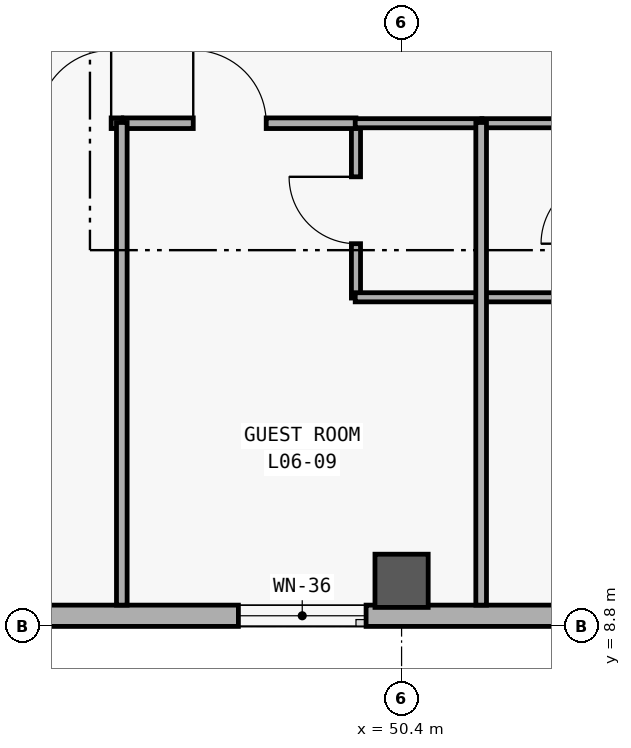
"""IFC4 building model, lengths in metres.
Left out: names, types, materials, properties, quantities, classifications, styles, units other than length and angle.
Written with IfcOpenShell. Run it as: python <this file> out.ifc"""

import sys

from ifc_helpers import new_model, si_unit, direction, frame, frame_2d, origin, origin_2d, place, context, subcontext, project, spatial, rectangle, extrude, element, fill, save


model = new_model("IFC4")
c1 = context("Model", 3, precision=1e-05, world=origin(), true_north=direction((0.0, 1.0)))
c2 = subcontext(c1, "Body", "Model", "MODEL_VIEW")
j1 = project(units=[si_unit("LENGTHUNIT", "METRE"), si_unit("PLANEANGLEUNIT", "RADIAN")], contexts=[c1])
p1 = place(None, origin())
s1 = spatial("IfcSite", under=j1, at=p1, CompositionType="ELEMENT")
p2 = place(p1, origin())
s2 = spatial("IfcBuilding", under=s1, at=p2, CompositionType="ELEMENT")
p3 = place(p2, frame((0.0, 0.0, 26.4)))
s3 = spatial("IfcBuildingStorey", under=s2, at=p3, CompositionType="ELEMENT", Elevation=26.4)
p4 = place(p3, frame((50.4, 9.4, 0.0), z_axis=(0.0, 0.0, 1.0), x_axis=(1.0, 0.0, 0.0)))
e1 = element("IfcColumn", 1, at=p4, inside=s3, PredefinedType="COLUMN", context=c2, shape_type="SweptSolid", body=[
    extrude(rectangle(XDim=0.7, YDim=0.7, at=origin_2d()), origin(), (0.0, 0.0, 1.0), 3.6),
])
p5 = place(p3, frame((75.32, 8.94, 0.0), z_axis=(0.0, 0.0, 1.0), x_axis=(-1.0, 0.0, 0.0)))
e2 = element("IfcWall", 2, at=p5, inside=s3, PredefinedType="SOLIDWALL", context=c2, shape_type="SweptSolid", body=[
    extrude(rectangle(XDim=66.64, YDim=0.28, at=frame_2d((33.32, 0.0))), origin(), (0.0, 0.0, 1.0), 3.32),
])
p6 = place(p5, frame((62.905, 0.0, 0.85)))
e3 = element("IfcOpeningElement", 3, at=p6, cuts=e2, PredefinedType="OPENING", context=c2, shape_type="SweptSolid", body=[
    extrude(rectangle(XDim=2.3, YDim=2.05, at=frame_2d((1.15, 1.025))), frame((0.0, 0.15, 0.0), z_axis=(0.0, -1.0, 0.0), x_axis=(1.0, 0.0, 0.0)), (0.0, 0.0, 1.0), 0.3),
])
p7 = place(p5, frame((57.952, 0.0, 0.85)))
e4 = element("IfcOpeningElement", 4, at=p7, cuts=e2, PredefinedType="OPENING", context=c2, shape_type="SweptSolid", body=[
    extrude(rectangle(XDim=2.75, YDim=2.1, at=frame_2d((1.375, 1.05))), frame((0.0, 0.15, 0.0), z_axis=(0.0, -1.0, 0.0), x_axis=(1.0, 0.0, 0.0)), (0.0, 0.0, 1.0), 0.3),
])
p8 = place(p5, frame((52.948, 0.0, 0.85)))
e5 = element("IfcOpeningElement", 5, at=p8, cuts=e2, PredefinedType="OPENING", context=c2, shape_type="SweptSolid", body=[
    extrude(rectangle(XDim=3.3, YDim=2.15, at=frame_2d((1.65, 1.075))), frame((0.0, 0.15, 0.0), z_axis=(0.0, -1.0, 0.0), x_axis=(1.0, 0.0, 0.0)), (0.0, 0.0, 1.0), 0.3),
])
p9 = place(p5, frame((49.28, 0.0, 0.85)))
e6 = element("IfcOpeningElement", 6, at=p9, cuts=e2, PredefinedType="OPENING", context=c2, shape_type="SweptSolid", body=[
    extrude(rectangle(XDim=1.18, YDim=1.5, at=frame_2d((0.59, 0.75))), frame((0.0, 0.15, 0.0), z_axis=(0.0, -1.0, 0.0), x_axis=(1.0, 0.0, 0.0)), (0.0, 0.0, 1.0), 0.3),
])
p10 = place(p5, frame((44.501, 0.0, 0.85)))
e7 = element("IfcOpeningElement", 7, at=p10, cuts=e2, PredefinedType="OPENING", context=c2, shape_type="SweptSolid", body=[
    extrude(rectangle(XDim=1.28, YDim=1.6, at=frame_2d((0.64, 0.8))), frame((0.0, 0.15, 0.0), z_axis=(0.0, -1.0, 0.0), x_axis=(1.0, 0.0, 0.0)), (0.0, 0.0, 1.0), 0.3),
])
p11 = place(p5, frame((39.723, 0.0, 0.85)))
e8 = element("IfcOpeningElement", 8, at=p11, cuts=e2, PredefinedType="OPENING", context=c2, shape_type="SweptSolid", body=[
    extrude(rectangle(XDim=1.38, YDim=1.7, at=frame_2d((0.69, 0.85))), frame((0.0, 0.15, 0.0), z_axis=(0.0, -1.0, 0.0), x_axis=(1.0, 0.0, 0.0)), (0.0, 0.0, 1.0), 0.3),
])
p12 = place(p5, frame((34.944, 0.0, 0.85)))
e9 = element("IfcOpeningElement", 9, at=p12, cuts=e2, PredefinedType="OPENING", context=c2, shape_type="SweptSolid", body=[
    extrude(rectangle(XDim=1.48, YDim=1.8, at=frame_2d((0.74, 0.9))), frame((0.0, 0.15, 0.0), z_axis=(0.0, -1.0, 0.0), x_axis=(1.0, 0.0, 0.0)), (0.0, 0.0, 1.0), 0.3),
])
p13 = place(p5, frame((30.165, 0.0, 0.85)))
e10 = element("IfcOpeningElement", 10, at=p13, cuts=e2, PredefinedType="OPENING", context=c2, shape_type="SweptSolid", body=[
    extrude(rectangle(XDim=1.58, YDim=1.85, at=frame_2d((0.79, 0.925))), frame((0.0, 0.15, 0.0), z_axis=(0.0, -1.0, 0.0), x_axis=(1.0, 0.0, 0.0)), (0.0, 0.0, 1.0), 0.3),
])
p14 = place(p5, frame((25.387, 0.0, 0.85)))
e11 = element("IfcOpeningElement", 11, at=p14, cuts=e2, PredefinedType="OPENING", context=c2, shape_type="SweptSolid", body=[
    extrude(rectangle(XDim=1.68, YDim=1.9, at=frame_2d((0.84, 0.95))), frame((0.0, 0.15, 0.0), z_axis=(0.0, -1.0, 0.0), x_axis=(1.0, 0.0, 0.0)), (0.0, 0.0, 1.0), 0.3),
])
p15 = place(p5, frame((20.608, 0.0, 0.85)))
e12 = element("IfcOpeningElement", 12, at=p15, cuts=e2, PredefinedType="OPENING", context=c2, shape_type="SweptSolid", body=[
    extrude(rectangle(XDim=1.78, YDim=1.95, at=frame_2d((0.89, 0.975))), frame((0.0, 0.15, 0.0), z_axis=(0.0, -1.0, 0.0), x_axis=(1.0, 0.0, 0.0)), (0.0, 0.0, 1.0), 0.3),
])
p16 = place(p5, frame((15.83, 0.0, 0.85)))
e13 = element("IfcOpeningElement", 13, at=p16, cuts=e2, PredefinedType="OPENING", context=c2, shape_type="SweptSolid", body=[
    extrude(rectangle(XDim=1.88, YDim=1.95, at=frame_2d((0.94, 0.975))), frame((0.0, 0.15, 0.0), z_axis=(0.0, -1.0, 0.0), x_axis=(1.0, 0.0, 0.0)), (0.0, 0.0, 1.0), 0.3),
])
p17 = place(p5, frame((11.016, 0.0, 0.85)))
e14 = element("IfcOpeningElement", 14, at=p17, cuts=e2, PredefinedType="OPENING", context=c2, shape_type="SweptSolid", body=[
    extrude(rectangle(XDim=2.05, YDim=1.95, at=frame_2d((1.025, 0.975))), frame((0.0, 0.15, 0.0), z_axis=(0.0, -1.0, 0.0), x_axis=(1.0, 0.0, 0.0)), (0.0, 0.0, 1.0), 0.3),
])
p18 = place(p5, frame((6.223, 0.0, 0.85)))
e15 = element("IfcOpeningElement", 15, at=p18, cuts=e2, PredefinedType="OPENING", context=c2, shape_type="SweptSolid", body=[
    extrude(rectangle(XDim=2.18, YDim=1.95, at=frame_2d((1.09, 0.975))), frame((0.0, 0.15, 0.0), z_axis=(0.0, -1.0, 0.0), x_axis=(1.0, 0.0, 0.0)), (0.0, 0.0, 1.0), 0.3),
])
p19 = place(p5, frame((1.394, 0.0, 0.85)))
e16 = element("IfcOpeningElement", 16, at=p19, cuts=e2, PredefinedType="OPENING", context=c2, shape_type="SweptSolid", body=[
    extrude(rectangle(XDim=2.38, YDim=1.95, at=frame_2d((1.19, 0.975))), frame((0.0, 0.15, 0.0), z_axis=(0.0, -1.0, 0.0), x_axis=(1.0, 0.0, 0.0)), (0.0, 0.0, 1.0), 0.3),
])
p20 = place(p3, frame((49.8, 13.12, 0.0), z_axis=(0.0, 0.0, 1.0), x_axis=(0.0, 1.0, 0.0)))
e17 = element("IfcWall", 17, at=p20, inside=s3, PredefinedType="PARTITIONING", context=c2, shape_type="SweptSolid", body=[
    extrude(rectangle(XDim=2.31, YDim=0.12, at=frame_2d((1.155, 0.0))), origin(), (0.0, 0.0, 1.0), 2.48),
])
p21 = place(p20, frame((0.715, 0.0, 0.0)))
e18 = element("IfcOpeningElement", 18, at=p21, cuts=e17, PredefinedType="OPENING", context=c2, shape_type="SweptSolid", body=[
    extrude(rectangle(XDim=0.88, YDim=2.15, at=frame_2d((0.44, 1.075))), frame((0.0, 0.07, 0.0), z_axis=(0.0, -1.0, 0.0), x_axis=(1.0, 0.0, 0.0)), (0.0, 0.0, 1.0), 0.14),
])
p22 = place(p3, frame((43.658, 15.42, 0.0), z_axis=(0.0, 0.0, 1.0), x_axis=(1.0, 0.0, 0.0)))
e19 = element("IfcWall", 19, at=p22, inside=s3, PredefinedType="PARTITIONING", context=c2, shape_type="SweptSolid", body=[
    extrude(rectangle(XDim=3.061, YDim=0.14, at=frame_2d((1.531, 0.0))), origin(), (0.0, 0.0, 1.0), 2.48),
])
p23 = place(p22, frame((1.961, 0.0, 0.0)))
e20 = element("IfcOpeningElement", 20, at=p23, cuts=e19, PredefinedType="OPENING", context=c2, shape_type="SweptSolid", body=[
    extrude(rectangle(XDim=0.96, YDim=2.25, at=frame_2d((0.48, 1.125))), frame((0.0, 0.08, 0.0), z_axis=(0.0, -1.0, 0.0), x_axis=(1.0, 0.0, 0.0)), (0.0, 0.0, 1.0), 0.16),
])
p24 = place(p3, frame((46.739, 15.42, 0.0), z_axis=(0.0, 0.0, 1.0), x_axis=(1.0, 0.0, 0.0)))
e21 = element("IfcWall", 21, at=p24, inside=s3, PredefinedType="PARTITIONING", context=c2, shape_type="SweptSolid", body=[
    extrude(rectangle(XDim=3.061, YDim=0.14, at=frame_2d((1.531, 0.0))), origin(), (0.0, 0.0, 1.0), 2.48),
])
p25 = place(p24, frame((0.92, 0.0, 0.0)))
e22 = element("IfcOpeningElement", 22, at=p25, cuts=e21, PredefinedType="OPENING", context=c2, shape_type="SweptSolid", body=[
    extrude(rectangle(XDim=0.96, YDim=2.25, at=frame_2d((0.48, 1.125))), frame((0.0, 0.08, 0.0), z_axis=(0.0, -1.0, 0.0), x_axis=(1.0, 0.0, 0.0)), (0.0, 0.0, 1.0), 0.16),
])
for number, where, z_axis, x_axis in (
    (23, (49.79, 13.13, 0.0), (0.0, 0.0, 1.0), (1.0, 0.0, 0.0)),
    (24, (49.79, 15.42, 0.0), (0.0, 0.0, 1.0), (1.0, 0.0, 0.0)),
):
    element("IfcWall", number, at=place(p3, frame(where, z_axis=z_axis, x_axis=x_axis)), inside=s3, PredefinedType="PARTITIONING", context=c2, shape_type="SweptSolid", body=[
        extrude(rectangle(XDim=1.667, YDim=0.12, at=frame_2d((0.833, 0.0))), origin(), (0.0, 0.0, 1.0), 2.48),
    ])
for number, where, z_axis, x_axis in (
    (25, (51.457, 13.13, 0.0), (0.0, 0.0, 1.0), (1.0, 0.0, 0.0)),
    (26, (51.457, 15.42, 0.0), (0.0, 0.0, 1.0), (1.0, 0.0, 0.0)),
):
    element("IfcWall", number, at=place(p3, frame(where, z_axis=z_axis, x_axis=x_axis)), inside=s3, PredefinedType="PARTITIONING", context=c2, shape_type="SweptSolid", body=[
        extrude(rectangle(XDim=1.668, YDim=0.12, at=frame_2d((0.834, 0.0))), origin(), (0.0, 0.0, 1.0), 2.48),
    ])
for number, where, z_axis, x_axis in (
    (27, (46.719, 9.08, 0.0), (0.0, 0.0, 1.0), (0.0, 1.0, 0.0)),
    (28, (51.447, 9.08, 0.0), (0.0, 0.0, 1.0), (0.0, 1.0, 0.0)),
):
    element("IfcWall", number, at=place(p3, frame(where, z_axis=z_axis, x_axis=x_axis)), inside=s3, PredefinedType="PARTITIONING", context=c2, shape_type="SweptSolid", body=[
        extrude(rectangle(XDim=6.35, YDim=0.14, at=frame_2d((3.175, 0.0))), origin(), (0.0, 0.0, 1.0), 2.48),
    ])
p26 = place(p14, origin())
e29 = element("IfcWindow", 29, at=p26, inside=s3, PartitioningType="SINGLE_PANEL", PredefinedType="WINDOW", context=c2, shape_type="SweptSolid", body=[
    extrude(rectangle(XDim=1.68, YDim=1.9, at=frame_2d((0.84, 0.95))), frame((0.0, 0.03, 0.0), z_axis=(0.0, -1.0, 0.0), x_axis=(1.0, 0.0, 0.0)), (0.0, 0.0, 1.0), 0.06),
])
fill(e11, e29)
p27 = place(p21, origin())
e30 = element("IfcDoor", 30, at=p27, inside=s3, OperationType="SINGLE_SWING_RIGHT", PredefinedType="DOOR", context=c2, shape_type="SweptSolid", body=[
    extrude(rectangle(XDim=0.88, YDim=2.15, at=frame_2d((0.44, 1.075))), frame((0.0, 0.025, 0.0), z_axis=(0.0, -1.0, 0.0), x_axis=(1.0, 0.0, 0.0)), (0.0, 0.0, 1.0), 0.05),
])
fill(e18, e30)
p28 = place(p23, origin())
e31 = element("IfcDoor", 31, at=p28, inside=s3, OperationType="SINGLE_SWING_RIGHT", PredefinedType="DOOR", context=c2, shape_type="SweptSolid", body=[
    extrude(rectangle(XDim=0.96, YDim=2.25, at=frame_2d((0.48, 1.125))), frame((0.0, 0.025, 0.0), z_axis=(0.0, -1.0, 0.0), x_axis=(1.0, 0.0, 0.0)), (0.0, 0.0, 1.0), 0.05),
])
fill(e20, e31)
p29 = place(p25, origin())
e32 = element("IfcDoor", 32, at=p29, inside=s3, OperationType="SINGLE_SWING_LEFT", PredefinedType="DOOR", context=c2, shape_type="SweptSolid", body=[
    extrude(rectangle(XDim=0.96, YDim=2.25, at=frame_2d((0.48, 1.125))), frame((0.0, 0.025, 0.0), z_axis=(0.0, -1.0, 0.0), x_axis=(1.0, 0.0, 0.0)), (0.0, 0.0, 1.0), 0.05),
])
fill(e22, e32)
save(model, sys.argv[1])
